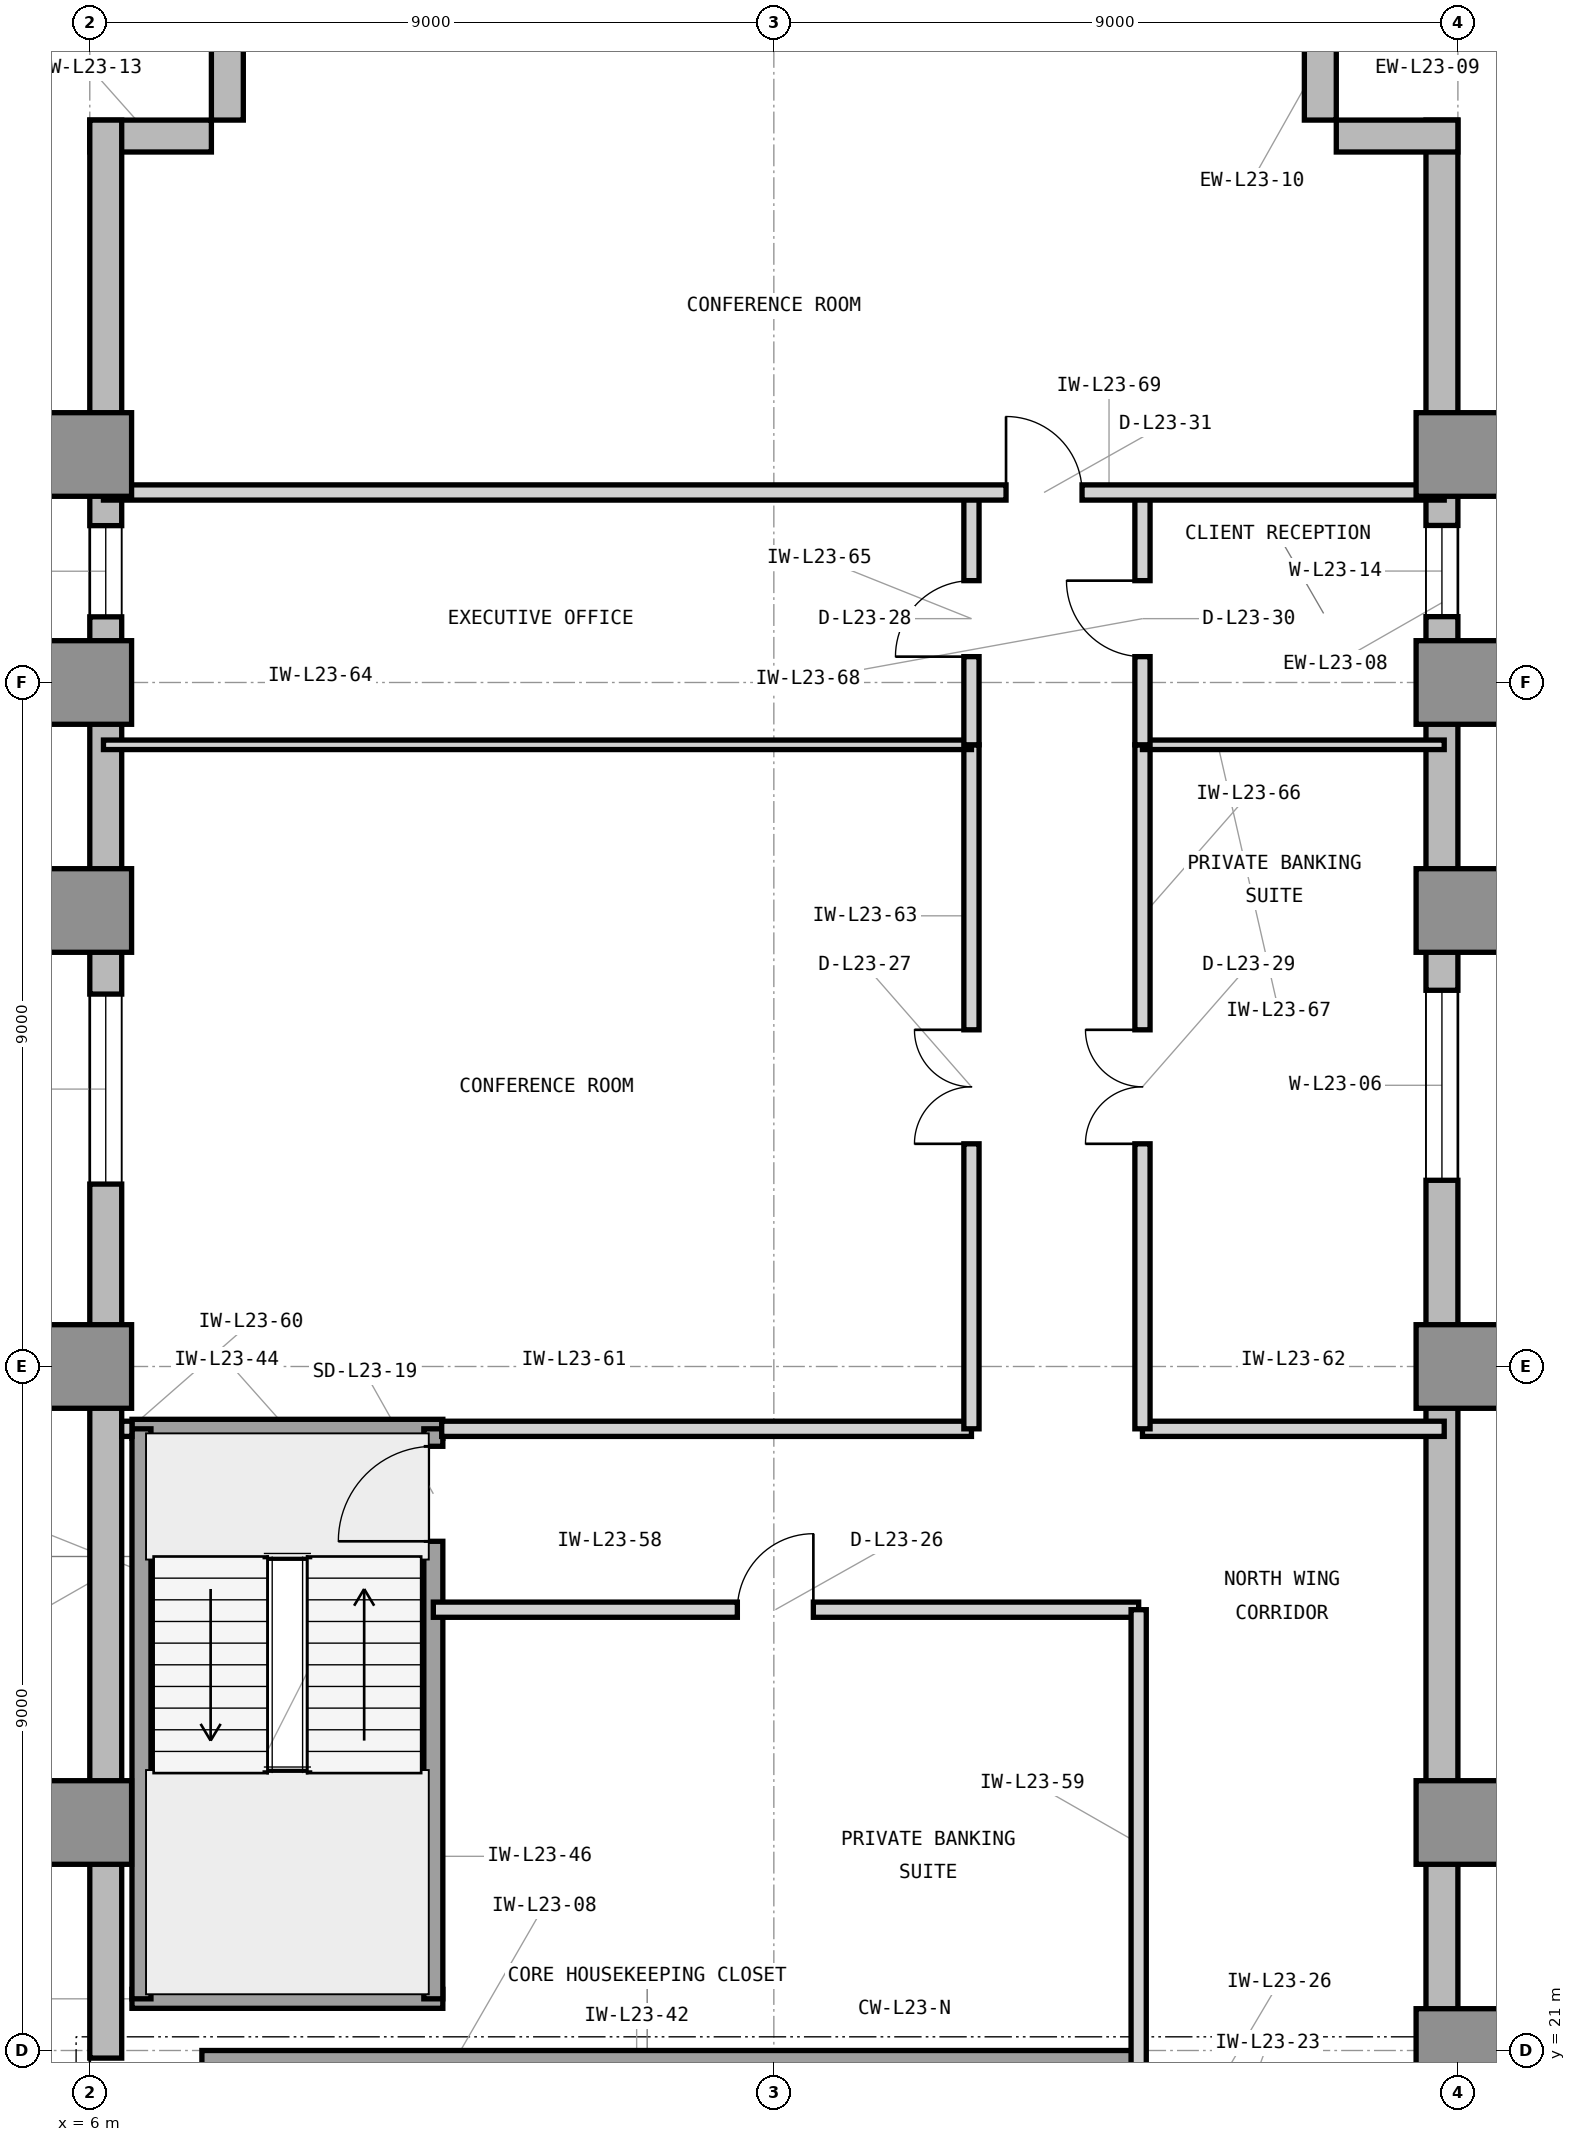
"""IFC4 building model, lengths in metres.
Left out: names, types, materials, properties, quantities, classifications, styles, units other than length and angle.
Written with IfcOpenShell. Run it as: python <this file> out.ifc"""

import sys

from ifc_helpers import new_model, si_unit, direction, frame, frame_2d, origin, origin_2d, place, context, subcontext, project, spatial, rectangle, extrude, element, fill, save


model = new_model("IFC4")
c1 = context("Model", 3, precision=1e-05, world=origin(), true_north=direction((0.0, 1.0)))
c2 = subcontext(c1, "Body", "Model", "MODEL_VIEW")
j1 = project(units=[si_unit("LENGTHUNIT", "METRE"), si_unit("PLANEANGLEUNIT", "RADIAN")], contexts=[c1])
p1 = place(None, origin())
s1 = spatial("IfcSite", under=j1, at=p1, CompositionType="ELEMENT")
p2 = place(p1, origin())
s2 = spatial("IfcBuilding", under=s1, at=p2, CompositionType="ELEMENT")
p3 = place(p2, frame((0.0, 0.0, 101.1)))
s3 = spatial("IfcBuildingStorey", under=s2, at=p3, CompositionType="ELEMENT", Elevation=101.1)
p4 = place(p3, frame((7.475, 20.65, 0.0), z_axis=(0.0, 0.0, 1.0), x_axis=(1.0, 0.0, 0.0)))
e1 = element("IfcWall", 1, at=p4, inside=s3, PredefinedType="SHEAR", context=c2, shape_type="SweptSolid", body=[
    extrude(rectangle(XDim=12.325, YDim=0.7, at=frame_2d((6.163, 0.0))), origin(), (0.0, 0.0, 1.0), 3.9),
])
for number, where, z_axis, x_axis in (
    (2, (24.0, 21.0, 0.0), (0.0, 0.0, 1.0), (1.0, 0.0, 0.0)),
    (3, (6.0, 24.0, 0.0), (0.0, 0.0, 1.0), (1.0, 0.0, 0.0)),
    (4, (24.0, 24.0, 0.0), (0.0, 0.0, 1.0), (1.0, 0.0, 0.0)),
    (5, (6.0, 30.0, 0.0), (0.0, 0.0, 1.0), (1.0, 0.0, 0.0)),
    (6, (24.0, 30.0, 0.0), (0.0, 0.0, 1.0), (1.0, 0.0, 0.0)),
    (7, (6.0, 36.0, 0.0), (0.0, 0.0, 1.0), (1.0, 0.0, 0.0)),
    (8, (24.0, 36.0, 0.0), (0.0, 0.0, 1.0), (1.0, 0.0, 0.0)),
    (9, (6.0, 39.0, 0.0), (0.0, 0.0, 1.0), (1.0, 0.0, 0.0)),
    (10, (24.0, 39.0, 0.0), (0.0, 0.0, 1.0), (1.0, 0.0, 0.0)),
    (11, (6.0, 42.0, 0.0), (0.0, 0.0, 1.0), (1.0, 0.0, 0.0)),
    (12, (24.0, 42.0, 0.0), (0.0, 0.0, 1.0), (1.0, 0.0, 0.0)),
):
    element("IfcColumn", number, at=place(p3, frame(where, z_axis=z_axis, x_axis=x_axis)), inside=s3, PredefinedType="COLUMN", context=c2, shape_type="SweptSolid", body=[
        extrude(rectangle(XDim=1.1, YDim=1.1, at=origin_2d()), origin(), (0.0, 0.0, 1.0), 3.9),
    ])
p5 = place(p3, frame((23.79, 21.0, 0.0), z_axis=(0.0, 0.0, 1.0), x_axis=(0.0, 1.0, 0.0)))
e13 = element("IfcWall", 13, at=p5, inside=s3, PredefinedType="STANDARD", context=c2, shape_type="SweptSolid", body=[
    extrude(rectangle(XDim=25.4, YDim=0.42, at=frame_2d((12.7, 0.0))), origin(), (0.0, 0.0, 1.0), 3.7),
])
p6 = place(p5, frame((11.45, 0.0, 0.85)))
e14 = element("IfcOpeningElement", 14, at=p6, cuts=e13, PredefinedType="OPENING", context=c2, shape_type="SweptSolid", body=[
    extrude(rectangle(XDim=2.5, YDim=2.25, at=frame_2d((1.25, 1.125))), frame((0.0, 0.22, 0.0), z_axis=(0.0, -1.0, 0.0), x_axis=(1.0, 0.0, 0.0)), (0.0, 0.0, 1.0), 0.44),
])
p7 = place(p5, frame((18.866, 0.0, 0.85)))
e15 = element("IfcOpeningElement", 15, at=p7, cuts=e13, PredefinedType="OPENING", context=c2, shape_type="SweptSolid", body=[
    extrude(rectangle(XDim=1.2, YDim=2.25, at=frame_2d((0.6, 1.125))), frame((0.0, 0.22, 0.0), z_axis=(0.0, -1.0, 0.0), x_axis=(1.0, 0.0, 0.0)), (0.0, 0.0, 1.0), 0.44),
])
for number, where, z_axis, x_axis in (
    (16, (24.0, 46.19, 0.0), (0.0, 0.0, 1.0), (-1.0, 0.0, 0.0)),
    (17, (22.19, 46.4, 0.0), (0.0, 0.0, 1.0), (0.0, 1.0, 0.0)),
    (18, (7.81, 48.0, 0.0), (0.0, 0.0, 1.0), (0.0, -1.0, 0.0)),
    (19, (7.6, 46.19, 0.0), (0.0, 0.0, 1.0), (-1.0, 0.0, 0.0)),
):
    element("IfcWall", number, at=place(p3, frame(where, z_axis=z_axis, x_axis=x_axis)), inside=s3, PredefinedType="STANDARD", context=c2, shape_type="SweptSolid", body=[
        extrude(rectangle(XDim=1.6, YDim=0.42, at=frame_2d((0.8, 0.0))), origin(), (0.0, 0.0, 1.0), 3.7),
    ])
p8 = place(p3, frame((6.21, 46.4, 0.0), z_axis=(0.0, 0.0, 1.0), x_axis=(0.0, -1.0, 0.0)))
e20 = element("IfcWall", 20, at=p8, inside=s3, PredefinedType="STANDARD", context=c2, shape_type="SweptSolid", body=[
    extrude(rectangle(XDim=25.5, YDim=0.42, at=frame_2d((12.75, 0.0))), origin(), (0.0, 0.0, 1.0), 3.7),
])
p9 = place(p8, frame((11.5, 0.0, 0.85)))
e21 = element("IfcOpeningElement", 21, at=p9, cuts=e20, PredefinedType="OPENING", context=c2, shape_type="SweptSolid", body=[
    extrude(rectangle(XDim=2.5, YDim=2.25, at=frame_2d((1.25, 1.125))), frame((0.0, 0.22, 0.0), z_axis=(0.0, -1.0, 0.0), x_axis=(1.0, 0.0, 0.0)), (0.0, 0.0, 1.0), 0.44),
])
p10 = place(p8, frame((5.336, 0.0, 0.85)))
e22 = element("IfcOpeningElement", 22, at=p10, cuts=e20, PredefinedType="OPENING", context=c2, shape_type="SweptSolid", body=[
    extrude(rectangle(XDim=1.2, YDim=2.25, at=frame_2d((0.6, 1.125))), frame((0.0, 0.22, 0.0), z_axis=(0.0, -1.0, 0.0), x_axis=(1.0, 0.0, 0.0)), (0.0, 0.0, 1.0), 0.44),
])
for number, where, z_axis, x_axis in (
    (23, (6.555, 21.68, 0.0), (0.0, 0.0, 1.0), (1.0, 0.0, 0.0)),
    (24, (6.555, 29.18, 0.0), (0.0, 0.0, 1.0), (1.0, 0.0, 0.0)),
):
    element("IfcWall", number, at=place(p3, frame(where, z_axis=z_axis, x_axis=x_axis)), inside=s3, PredefinedType="SHEAR", context=c2, shape_type="SweptSolid", body=[
        extrude(rectangle(XDim=4.09, YDim=0.25, at=frame_2d((2.045, 0.0))), origin(), (0.0, 0.0, 1.0), 3.9),
    ])
p11 = place(p3, frame((6.68, 21.68, 0.0), z_axis=(0.0, 0.0, 1.0), x_axis=(0.0, 1.0, 0.0)))
e25 = element("IfcWall", 25, at=p11, inside=s3, PredefinedType="SHEAR", context=c2, shape_type="SweptSolid", body=[
    extrude(rectangle(XDim=7.5, YDim=0.25, at=frame_2d((3.75, 0.0))), origin(), (0.0, 0.0, 1.0), 3.9),
])
p12 = place(p3, frame((10.52, 21.68, 0.0), z_axis=(0.0, 0.0, 1.0), x_axis=(0.0, 1.0, 0.0)))
e26 = element("IfcWall", 26, at=p12, inside=s3, PredefinedType="SHEAR", context=c2, shape_type="SweptSolid", body=[
    extrude(rectangle(XDim=7.5, YDim=0.25, at=frame_2d((3.75, 0.0))), origin(), (0.0, 0.0, 1.0), 3.9),
])
p13 = place(p12, frame((6.02, 0.0, 0.0)))
e27 = element("IfcOpeningElement", 27, at=p13, cuts=e26, PredefinedType="OPENING", context=c2, shape_type="SweptSolid", body=[
    extrude(rectangle(XDim=1.25, YDim=2.2, at=frame_2d((0.625, 1.1))), frame((0.0, 0.135, 0.0), z_axis=(0.0, -1.0, 0.0), x_axis=(1.0, 0.0, 0.0)), (0.0, 0.0, 1.0), 0.27),
])
p14 = place(p3, frame((10.52, 26.8, 0.0), z_axis=(0.0, 0.0, 1.0), x_axis=(1.0, 0.0, 0.0)))
e28 = element("IfcWall", 28, at=p14, inside=s3, PredefinedType="PARTITIONING", context=c2, shape_type="SweptSolid", body=[
    extrude(rectangle(XDim=9.28, YDim=0.2, at=frame_2d((4.64, 0.0))), origin(), (0.0, 0.0, 1.0), 3.69),
])
p15 = place(p14, frame((4.0, 0.0, 0.0)))
e29 = element("IfcOpeningElement", 29, at=p15, cuts=e28, PredefinedType="OPENING", context=c2, shape_type="SweptSolid", body=[
    extrude(rectangle(XDim=1.0, YDim=2.15, at=frame_2d((0.5, 1.075))), frame((0.0, 0.11, 0.0), z_axis=(0.0, -1.0, 0.0), x_axis=(1.0, 0.0, 0.0)), (0.0, 0.0, 1.0), 0.22),
])
p16 = place(p3, frame((19.8, 20.65, 0.0), z_axis=(0.0, 0.0, 1.0), x_axis=(0.0, 1.0, 0.0)))
e30 = element("IfcWall", 30, at=p16, inside=s3, PredefinedType="PARTITIONING", context=c2, shape_type="SweptSolid", body=[
    extrude(rectangle(XDim=6.15, YDim=0.2, at=frame_2d((3.075, 0.0))), origin(), (0.0, 0.0, 1.0), 3.69),
])
p17 = place(p3, frame((6.42, 29.18, 0.0), z_axis=(0.0, 0.0, 1.0), x_axis=(1.0, 0.0, 0.0)))
e31 = element("IfcWall", 31, at=p17, inside=s3, PredefinedType="PARTITIONING", context=c2, shape_type="SweptSolid", body=[
    extrude(rectangle(XDim=0.135, YDim=0.2, at=frame_2d((0.067, 0.0))), origin(), (0.0, 0.0, 1.0), 3.69),
])
p18 = place(p3, frame((10.63, 29.18, 0.0), z_axis=(0.0, 0.0, 1.0), x_axis=(1.0, 0.0, 0.0)))
e32 = element("IfcWall", 32, at=p18, inside=s3, PredefinedType="PARTITIONING", context=c2, shape_type="SweptSolid", body=[
    extrude(rectangle(XDim=6.97, YDim=0.2, at=frame_2d((3.485, 0.0))), origin(), (0.0, 0.0, 1.0), 3.69),
])
p19 = place(p3, frame((19.85, 29.18, 0.0), z_axis=(0.0, 0.0, 1.0), x_axis=(1.0, 0.0, 0.0)))
e33 = element("IfcWall", 33, at=p19, inside=s3, PredefinedType="PARTITIONING", context=c2, shape_type="SweptSolid", body=[
    extrude(rectangle(XDim=3.97, YDim=0.2, at=frame_2d((1.985, 0.0))), origin(), (0.0, 0.0, 1.0), 3.69),
])
p20 = place(p3, frame((17.6, 29.18, 0.0), z_axis=(0.0, 0.0, 1.0), x_axis=(0.0, 1.0, 0.0)))
e34 = element("IfcWall", 34, at=p20, inside=s3, PredefinedType="PARTITIONING", context=c2, shape_type="SweptSolid", body=[
    extrude(rectangle(XDim=9.0, YDim=0.2, at=frame_2d((4.5, 0.0))), origin(), (0.0, 0.0, 1.0), 3.69),
])
p21 = place(p20, frame((3.75, 0.0, 0.0)))
e35 = element("IfcOpeningElement", 35, at=p21, cuts=e34, PredefinedType="OPENING", context=c2, shape_type="SweptSolid", body=[
    extrude(rectangle(XDim=1.5, YDim=2.3, at=frame_2d((0.75, 1.15))), frame((0.0, 0.11, 0.0), z_axis=(0.0, -1.0, 0.0), x_axis=(1.0, 0.0, 0.0)), (0.0, 0.0, 1.0), 0.22),
])
p22 = place(p3, frame((6.18, 38.18, 0.0), z_axis=(0.0, 0.0, 1.0), x_axis=(1.0, 0.0, 0.0)))
e36 = element("IfcWall", 36, at=p22, inside=s3, PredefinedType="PARTITIONING", context=c2, shape_type="SweptSolid", body=[
    extrude(rectangle(XDim=11.42, YDim=0.125, at=frame_2d((5.71, 0.0))), origin(), (0.0, 0.0, 1.0), 3.69),
])
p23 = place(p3, frame((17.6, 38.18, 0.0), z_axis=(0.0, 0.0, 1.0), x_axis=(0.0, 1.0, 0.0)))
e37 = element("IfcWall", 37, at=p23, inside=s3, PredefinedType="PARTITIONING", context=c2, shape_type="SweptSolid", body=[
    extrude(rectangle(XDim=3.32, YDim=0.2, at=frame_2d((1.66, 0.0))), origin(), (0.0, 0.0, 1.0), 3.69),
])
p24 = place(p23, frame((1.16, 0.0, 0.0)))
e38 = element("IfcOpeningElement", 38, at=p24, cuts=e37, PredefinedType="OPENING", context=c2, shape_type="SweptSolid", body=[
    extrude(rectangle(XDim=1.0, YDim=2.15, at=frame_2d((0.5, 1.075))), frame((0.0, 0.11, 0.0), z_axis=(0.0, -1.0, 0.0), x_axis=(1.0, 0.0, 0.0)), (0.0, 0.0, 1.0), 0.22),
])
p25 = place(p3, frame((19.85, 29.18, 0.0), z_axis=(0.0, 0.0, 1.0), x_axis=(0.0, 1.0, 0.0)))
e39 = element("IfcWall", 39, at=p25, inside=s3, PredefinedType="PARTITIONING", context=c2, shape_type="SweptSolid", body=[
    extrude(rectangle(XDim=9.0, YDim=0.2, at=frame_2d((4.5, 0.0))), origin(), (0.0, 0.0, 1.0), 3.69),
])
p26 = place(p25, frame((3.75, 0.0, 0.0)))
e40 = element("IfcOpeningElement", 40, at=p26, cuts=e39, PredefinedType="OPENING", context=c2, shape_type="SweptSolid", body=[
    extrude(rectangle(XDim=1.5, YDim=2.3, at=frame_2d((0.75, 1.15))), frame((0.0, 0.11, 0.0), z_axis=(0.0, -1.0, 0.0), x_axis=(1.0, 0.0, 0.0)), (0.0, 0.0, 1.0), 0.22),
])
p27 = place(p3, frame((19.85, 38.18, 0.0), z_axis=(0.0, 0.0, 1.0), x_axis=(1.0, 0.0, 0.0)))
e41 = element("IfcWall", 41, at=p27, inside=s3, PredefinedType="PARTITIONING", context=c2, shape_type="SweptSolid", body=[
    extrude(rectangle(XDim=3.97, YDim=0.125, at=frame_2d((1.985, 0.0))), origin(), (0.0, 0.0, 1.0), 3.69),
])
p28 = place(p3, frame((19.85, 38.18, 0.0), z_axis=(0.0, 0.0, 1.0), x_axis=(0.0, 1.0, 0.0)))
e42 = element("IfcWall", 42, at=p28, inside=s3, PredefinedType="PARTITIONING", context=c2, shape_type="SweptSolid", body=[
    extrude(rectangle(XDim=3.32, YDim=0.2, at=frame_2d((1.66, 0.0))), origin(), (0.0, 0.0, 1.0), 3.69),
])
p29 = place(p28, frame((1.16, 0.0, 0.0)))
e43 = element("IfcOpeningElement", 43, at=p29, cuts=e42, PredefinedType="OPENING", context=c2, shape_type="SweptSolid", body=[
    extrude(rectangle(XDim=1.0, YDim=2.15, at=frame_2d((0.5, 1.075))), frame((0.0, 0.11, 0.0), z_axis=(0.0, -1.0, 0.0), x_axis=(1.0, 0.0, 0.0)), (0.0, 0.0, 1.0), 0.22),
])
p30 = place(p3, frame((6.18, 41.5, 0.0), z_axis=(0.0, 0.0, 1.0), x_axis=(1.0, 0.0, 0.0)))
e44 = element("IfcWall", 44, at=p30, inside=s3, PredefinedType="PARTITIONING", context=c2, shape_type="SweptSolid", body=[
    extrude(rectangle(XDim=17.64, YDim=0.2, at=frame_2d((8.82, 0.0))), origin(), (0.0, 0.0, 1.0), 3.69),
])
p31 = place(p30, frame((11.875, 0.0, 0.0)))
e45 = element("IfcOpeningElement", 45, at=p31, cuts=e44, PredefinedType="OPENING", context=c2, shape_type="SweptSolid", body=[
    extrude(rectangle(XDim=1.0, YDim=2.15, at=frame_2d((0.5, 1.075))), frame((0.0, 0.11, 0.0), z_axis=(0.0, -1.0, 0.0), x_axis=(1.0, 0.0, 0.0)), (0.0, 0.0, 1.0), 0.22),
])
p32 = place(p6, origin())
e46 = element("IfcWindow", 46, at=p32, inside=s3, PartitioningType="SINGLE_PANEL", PredefinedType="WINDOW", context=c2, shape_type="SweptSolid", body=[
    extrude(rectangle(XDim=2.5, YDim=2.25, at=frame_2d((1.25, 1.125))), frame((0.0, 0.11, 0.0), z_axis=(0.0, -1.0, 0.0), x_axis=(1.0, 0.0, 0.0)), (0.0, 0.0, 1.0), 0.06),
])
fill(e14, e46)
p33 = place(p9, origin())
e47 = element("IfcWindow", 47, at=p33, inside=s3, PartitioningType="SINGLE_PANEL", PredefinedType="WINDOW", context=c2, shape_type="SweptSolid", body=[
    extrude(rectangle(XDim=2.5, YDim=2.25, at=frame_2d((1.25, 1.125))), frame((0.0, 0.11, 0.0), z_axis=(0.0, -1.0, 0.0), x_axis=(1.0, 0.0, 0.0)), (0.0, 0.0, 1.0), 0.06),
])
fill(e21, e47)
p34 = place(p13, origin())
e48 = element("IfcDoor", 48, at=p34, inside=s3, OperationType="SINGLE_SWING_LEFT", PredefinedType="DOOR", context=c2, shape_type="SweptSolid", body=[
    extrude(rectangle(XDim=1.25, YDim=2.2, at=frame_2d((0.625, 1.1))), frame((0.0, 0.025, 0.0), z_axis=(0.0, -1.0, 0.0), x_axis=(1.0, 0.0, 0.0)), (0.0, 0.0, 1.0), 0.05),
])
fill(e27, e48)
p35 = place(p15, origin())
e49 = element("IfcDoor", 49, at=p35, inside=s3, OperationType="SINGLE_SWING_RIGHT", PredefinedType="DOOR", context=c2, shape_type="SweptSolid", body=[
    extrude(rectangle(XDim=1.0, YDim=2.15, at=frame_2d((0.5, 1.075))), frame((0.0, 0.025, 0.0), z_axis=(0.0, -1.0, 0.0), x_axis=(1.0, 0.0, 0.0)), (0.0, 0.0, 1.0), 0.05),
])
fill(e29, e49)
p36 = place(p21, origin())
e50 = element("IfcDoor", 50, at=p36, inside=s3, OperationType="DOUBLE_DOOR_SINGLE_SWING", PredefinedType="DOOR", context=c2, shape_type="SweptSolid", body=[
    extrude(rectangle(XDim=1.5, YDim=2.3, at=frame_2d((0.75, 1.15))), frame((0.0, 0.025, 0.0), z_axis=(0.0, -1.0, 0.0), x_axis=(1.0, 0.0, 0.0)), (0.0, 0.0, 1.0), 0.05),
])
fill(e35, e50)
p37 = place(p24, origin())
e51 = element("IfcDoor", 51, at=p37, inside=s3, OperationType="SINGLE_SWING_LEFT", PredefinedType="DOOR", context=c2, shape_type="SweptSolid", body=[
    extrude(rectangle(XDim=1.0, YDim=2.15, at=frame_2d((0.5, 1.075))), frame((0.0, 0.025, 0.0), z_axis=(0.0, -1.0, 0.0), x_axis=(1.0, 0.0, 0.0)), (0.0, 0.0, 1.0), 0.05),
])
fill(e38, e51)
p38 = place(p26, origin())
e52 = element("IfcDoor", 52, at=p38, inside=s3, OperationType="DOUBLE_DOOR_SINGLE_SWING", PredefinedType="DOOR", context=c2, shape_type="SweptSolid", body=[
    extrude(rectangle(XDim=1.5, YDim=2.3, at=frame_2d((0.75, 1.15))), frame((0.0, 0.025, 0.0), z_axis=(0.0, -1.0, 0.0), x_axis=(1.0, 0.0, 0.0)), (0.0, 0.0, 1.0), 0.05),
])
fill(e40, e52)
p39 = place(p29, origin())
e53 = element("IfcDoor", 53, at=p39, inside=s3, OperationType="SINGLE_SWING_RIGHT", PredefinedType="DOOR", context=c2, shape_type="SweptSolid", body=[
    extrude(rectangle(XDim=1.0, YDim=2.15, at=frame_2d((0.5, 1.075))), frame((0.0, 0.025, 0.0), z_axis=(0.0, -1.0, 0.0), x_axis=(1.0, 0.0, 0.0)), (0.0, 0.0, 1.0), 0.05),
])
fill(e43, e53)
p40 = place(p31, origin())
e54 = element("IfcDoor", 54, at=p40, inside=s3, OperationType="SINGLE_SWING_LEFT", PredefinedType="DOOR", context=c2, shape_type="SweptSolid", body=[
    extrude(rectangle(XDim=1.0, YDim=2.15, at=frame_2d((0.5, 1.075))), frame((0.0, 0.025, 0.0), z_axis=(0.0, -1.0, 0.0), x_axis=(1.0, 0.0, 0.0)), (0.0, 0.0, 1.0), 0.05),
])
fill(e45, e54)
p41 = place(p10, origin())
e55 = element("IfcWindow", 55, at=p41, inside=s3, PartitioningType="SINGLE_PANEL", PredefinedType="WINDOW", context=c2, shape_type="SweptSolid", body=[
    extrude(rectangle(XDim=1.2, YDim=2.25, at=frame_2d((0.6, 1.125))), frame((0.0, 0.11, 0.0), z_axis=(0.0, -1.0, 0.0), x_axis=(1.0, 0.0, 0.0)), (0.0, 0.0, 1.0), 0.06),
])
fill(e22, e55)
p42 = place(p7, origin())
e56 = element("IfcWindow", 56, at=p42, inside=s3, PartitioningType="SINGLE_PANEL", PredefinedType="WINDOW", context=c2, shape_type="SweptSolid", body=[
    extrude(rectangle(XDim=1.2, YDim=2.25, at=frame_2d((0.6, 1.125))), frame((0.0, 0.11, 0.0), z_axis=(0.0, -1.0, 0.0), x_axis=(1.0, 0.0, 0.0)), (0.0, 0.0, 1.0), 0.06),
])
fill(e15, e56)
save(model, sys.argv[1])
